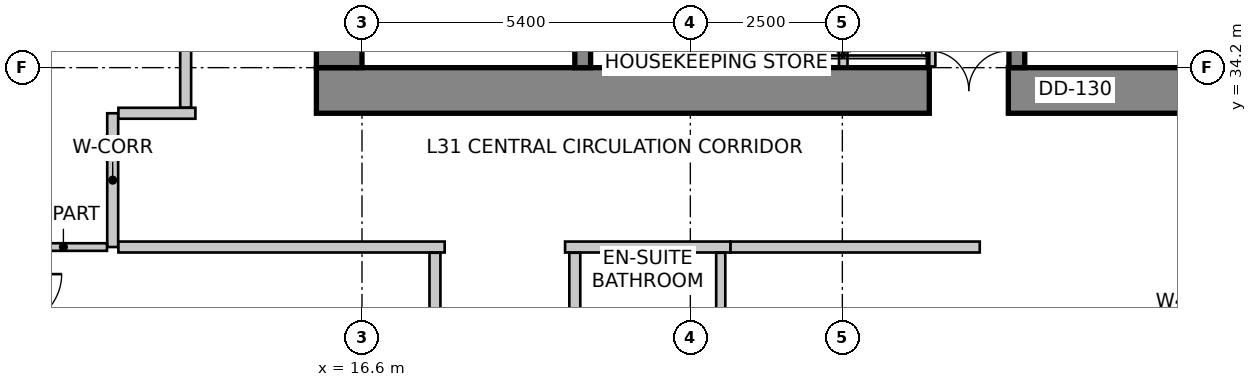
"""IFC4 building model, lengths in metres.
Left out: names, types, materials, properties, quantities, classifications, styles, units other than length and angle.
Written with IfcOpenShell. Run it as: python <this file> out.ifc"""

import sys

from ifc_helpers import new_model, si_unit, direction, frame, frame_2d, origin, place, context, subcontext, project, spatial, rectangle, extrude, source, transform, mapped, element, fill, save


model = new_model("IFC4")
c1 = context("Model", 3, precision=1e-05, world=origin(), true_north=direction((0.0, 1.0)))
c2 = subcontext(c1, "Body", "Model", "MODEL_VIEW")
j1 = project(units=[si_unit("LENGTHUNIT", "METRE"), si_unit("PLANEANGLEUNIT", "RADIAN")], contexts=[c1])
p1 = place(None, origin())
s1 = spatial("IfcSite", under=j1, at=p1, CompositionType="ELEMENT")
p2 = place(p1, origin())
s2 = spatial("IfcBuilding", under=s1, at=p2, CompositionType="ELEMENT")
p3 = place(p2, frame((0.0, 0.0, 128.6)))
s3 = spatial("IfcBuildingStorey", under=s2, at=p3, CompositionType="ELEMENT", Elevation=128.6)
p4 = place(p3, frame((15.85, 33.825, 0.0), z_axis=(0.0, 0.0, 1.0), x_axis=(1.0, 0.0, 0.0)))
e1 = element("IfcWall", 1, at=p4, inside=s3, PredefinedType="SHEAR", context=c2, shape_type="SweptSolid", body=[
    extrude(rectangle(XDim=15.9, YDim=0.75, at=frame_2d((7.95, 0.0))), origin(), (0.0, 0.0, 1.0), 3.6),
])
m1 = source(origin(), c2, "Body", "SweptSolid", [
    extrude(rectangle(XDim=1.3, YDim=2.15, at=frame_2d((0.65, 1.075))), frame((0.0, 0.385, 0.0), z_axis=(0.0, -1.0, 0.0), x_axis=(1.0, 0.0, 0.0)), (0.0, 0.0, 1.0), 0.77),
])
p5 = place(p4, frame((10.08, 0.0, 0.0)))
e2 = element("IfcOpeningElement", 2, at=p5, cuts=e1, PredefinedType="OPENING", context=c2, shape_type="MappedRepresentation", body=[
    mapped(m1, transform((0.0, 0.0, 0.0), scale=1.0)),
])
p6 = place(p3, frame((16.225, 34.2, 0.0), z_axis=(0.0, 0.0, 1.0), x_axis=(0.0, 1.0, 0.0)))
e3 = element("IfcWall", 3, at=p6, inside=s3, PredefinedType="SHEAR", context=c2, shape_type="SweptSolid", body=[
    extrude(rectangle(XDim=11.4, YDim=0.75, at=frame_2d((5.7, 0.0))), origin(), (0.0, 0.0, 1.0), 3.6),
])
m2 = source(origin(), c2, "Body", "SweptSolid", [
    extrude(rectangle(XDim=1.1, YDim=2.15, at=frame_2d((0.55, 1.075))), frame((0.0, 0.385, 0.0), z_axis=(0.0, -1.0, 0.0), x_axis=(1.0, 0.0, 0.0)), (0.0, 0.0, 1.0), 0.77),
])
p7 = place(p6, frame((7.15, 0.0, 0.0)))
e4 = element("IfcOpeningElement", 4, at=p7, cuts=e3, PredefinedType="OPENING", context=c2, shape_type="MappedRepresentation", body=[
    mapped(m2, transform((0.0, 0.0, 0.0), scale=1.0)),
])
p8 = place(p3, frame((20.23, 34.2, 0.0), z_axis=(0.0, 0.0, 1.0), x_axis=(0.0, 1.0, 0.0)))
e5 = element("IfcWall", 5, at=p8, inside=s3, PredefinedType="SHEAR", context=c2, shape_type="SweptSolid", body=[
    extrude(rectangle(XDim=9.06, YDim=0.26, at=frame_2d((4.53, 0.0))), origin(), (0.0, 0.0, 1.0), 3.6),
])
m3 = source(origin(), c2, "Body", "SweptSolid", [
    extrude(rectangle(XDim=1.1, YDim=2.15, at=frame_2d((0.55, 1.075))), frame((0.0, 0.14, 0.0), z_axis=(0.0, -1.0, 0.0), x_axis=(1.0, 0.0, 0.0)), (0.0, 0.0, 1.0), 0.28),
])
p9 = place(p8, frame((7.45, 0.0, 0.0)))
e6 = element("IfcOpeningElement", 6, at=p9, cuts=e5, PredefinedType="OPENING", context=c2, shape_type="MappedRepresentation", body=[
    mapped(m3, transform((0.0, 0.0, 0.0), scale=1.0)),
])
p10 = place(p3, frame((27.37, 34.2, 0.0), z_axis=(0.0, 0.0, 1.0), x_axis=(0.0, 1.0, 0.0)))
e7 = element("IfcWall", 7, at=p10, inside=s3, PredefinedType="SHEAR", context=c2, shape_type="SweptSolid", body=[
    extrude(rectangle(XDim=9.06, YDim=0.26, at=frame_2d((4.53, 0.0))), origin(), (0.0, 0.0, 1.0), 3.6),
])
p11 = place(p10, frame((7.45, 0.0, 0.0)))
e8 = element("IfcOpeningElement", 8, at=p11, cuts=e7, PredefinedType="OPENING", context=c2, shape_type="MappedRepresentation", body=[
    mapped(m3, transform((0.0, 0.0, 0.0), scale=1.0)),
])
p12 = place(p3, frame((28.884, 28.792, 0.0), z_axis=(0.0, 0.0, 1.0), x_axis=(0.707064797706, 0.707148762175, 0.0)))
e9 = element("IfcWall", 9, at=p12, inside=s3, PredefinedType="SOLIDWALL", context=c2, shape_type="SweptSolid", body=[
    extrude(rectangle(XDim=2.908, YDim=0.3, at=frame_2d((1.454, 0.0))), origin(), (0.0, 0.0, 1.0), 3.35),
])
m4 = source(origin(), c2, "Body", "SweptSolid", [
    extrude(rectangle(XDim=2.1, YDim=2.0, at=frame_2d((1.05, 1.0))), frame((0.0, 0.16, 0.0), z_axis=(0.0, -1.0, 0.0), x_axis=(1.0, 0.0, 0.0)), (0.0, 0.0, 1.0), 0.32),
])
p13 = place(p12, frame((0.404, 0.0, 0.85)))
e10 = element("IfcOpeningElement", 10, at=p13, cuts=e9, PredefinedType="OPENING", context=c2, shape_type="MappedRepresentation", body=[
    mapped(m4, transform((0.0, 0.0, 0.0), scale=1.0)),
])
p14 = place(p3, frame((13.269, 47.134, 0.0), z_axis=(0.0, 0.0, 1.0), x_axis=(-0.319929596295, -0.947441319246, 0.0)))
e11 = element("IfcWall", 11, at=p14, inside=s3, PredefinedType="SOLIDWALL", context=c2, shape_type="SweptSolid", body=[
    extrude(rectangle(XDim=16.134, YDim=0.3, at=frame_2d((8.067, 0.0))), origin(), (0.0, 0.0, 1.0), 3.35),
])
p15 = place(p14, frame((2.426, 0.0, 0.85)))
e12 = element("IfcOpeningElement", 12, at=p15, cuts=e11, PredefinedType="OPENING", context=c2, shape_type="MappedRepresentation", body=[
    mapped(m4, transform((0.0, 0.0, 0.0), scale=1.0)),
])
m5 = source(origin(), c2, "Body", "SweptSolid", [
    extrude(rectangle(XDim=2.4, YDim=2.2, at=frame_2d((1.2, 1.1))), frame((0.0, 0.16, 0.0), z_axis=(0.0, -1.0, 0.0), x_axis=(1.0, 0.0, 0.0)), (0.0, 0.0, 1.0), 0.32),
])
p16 = place(p14, frame((7.211, 0.0, 0.85)))
e13 = element("IfcOpeningElement", 13, at=p16, cuts=e11, PredefinedType="OPENING", context=c2, shape_type="MappedRepresentation", body=[
    mapped(m5, transform((0.0, 0.0, 0.0), scale=1.0)),
])
p17 = place(p14, frame((12.297, 0.0, 0.85)))
e14 = element("IfcOpeningElement", 14, at=p17, cuts=e11, PredefinedType="OPENING", context=c2, shape_type="MappedRepresentation", body=[
    mapped(m4, transform((0.0, 0.0, 0.0), scale=1.0)),
])
p18 = place(p3, frame((8.185, 31.834, 0.0), z_axis=(0.0, 0.0, 1.0), x_axis=(0.189707113148, -0.981840725994, 0.0)))
e15 = element("IfcWall", 15, at=p18, inside=s3, PredefinedType="SOLIDWALL", context=c2, shape_type="SweptSolid", body=[
    extrude(rectangle(XDim=21.221, YDim=0.3, at=frame_2d((10.611, 0.0))), origin(), (0.0, 0.0, 1.0), 3.35),
])
m6 = source(origin(), c2, "Body", "SweptSolid", [
    extrude(rectangle(XDim=1.5, YDim=1.8, at=frame_2d((0.75, 0.9))), frame((0.0, 0.16, 0.0), z_axis=(0.0, -1.0, 0.0), x_axis=(1.0, 0.0, 0.0)), (0.0, 0.0, 1.0), 0.32),
])
p19 = place(p18, frame((0.977, 0.0, 0.85)))
e16 = element("IfcOpeningElement", 16, at=p19, cuts=e15, PredefinedType="OPENING", context=c2, shape_type="MappedRepresentation", body=[
    mapped(m6, transform((0.0, 0.0, 0.0), scale=1.0)),
])
p20 = place(p18, frame((4.219, 0.0, 0.85)))
e17 = element("IfcOpeningElement", 17, at=p20, cuts=e15, PredefinedType="OPENING", context=c2, shape_type="MappedRepresentation", body=[
    mapped(m5, transform((0.0, 0.0, 0.0), scale=1.0)),
])
p21 = place(p18, frame((8.259, 0.0, 0.85)))
e18 = element("IfcOpeningElement", 18, at=p21, cuts=e15, PredefinedType="OPENING", context=c2, shape_type="MappedRepresentation", body=[
    mapped(m6, transform((0.0, 0.0, 0.0), scale=1.0)),
])
m7 = source(origin(), c2, "Body", "SweptSolid", [
    extrude(rectangle(XDim=1.8, YDim=2.1, at=frame_2d((0.9, 1.05))), frame((0.0, 0.16, 0.0), z_axis=(0.0, -1.0, 0.0), x_axis=(1.0, 0.0, 0.0)), (0.0, 0.0, 1.0), 0.32),
])
p22 = place(p18, frame((10.401, 0.0, 0.85)))
e19 = element("IfcOpeningElement", 19, at=p22, cuts=e15, PredefinedType="OPENING", context=c2, shape_type="MappedRepresentation", body=[
    mapped(m7, transform((0.0, 0.0, 0.0), scale=1.0)),
])
p23 = place(p18, frame((12.842, 0.0, 0.85)))
e20 = element("IfcOpeningElement", 20, at=p23, cuts=e15, PredefinedType="OPENING", context=c2, shape_type="MappedRepresentation", body=[
    mapped(m6, transform((0.0, 0.0, 0.0), scale=1.0)),
])
p24 = place(p18, frame((16.661, 0.0, 0.85)))
e21 = element("IfcOpeningElement", 21, at=p24, cuts=e15, PredefinedType="OPENING", context=c2, shape_type="MappedRepresentation", body=[
    mapped(m5, transform((0.0, 0.0, 0.0), scale=1.0)),
])
for number, where, z_axis, x_axis in (
    (22, (25.96, 34.22, 0.0), (0.0, 0.0, 1.0), (0.0, 1.0, 0.0)),
    (23, (23.07, 34.22, 0.0), (0.0, 0.0, 1.0), (0.0, 1.0, 0.0)),
    (24, (24.515, 34.22, 0.0), (0.0, 0.0, 1.0), (0.0, 1.0, 0.0)),
):
    element("IfcWall", number, at=place(p3, frame(where, z_axis=z_axis, x_axis=x_axis)), inside=s3, PredefinedType="SOLIDWALL", context=c2, shape_type="SweptSolid", body=[
        extrude(rectangle(XDim=1.62, YDim=0.14, at=frame_2d((0.81, 0.0))), origin(), (0.0, 0.0, 1.0), 2.642),
    ])
p25 = place(p3, frame((12.5, 31.25, 0.0), z_axis=(0.0, 0.0, 1.0), x_axis=(0.0, 1.0, 0.0)))
e25 = element("IfcWall", 25, at=p25, inside=s3, PredefinedType="PARTITIONING", context=c2, shape_type="SweptSolid", body=[
    extrude(rectangle(XDim=2.2, YDim=0.18, at=frame_2d((1.1, 0.0))), origin(), (0.0, 0.0, 1.0), 3.019),
])
p26 = place(p3, frame((12.594, 33.45, 0.0), z_axis=(0.0, 0.0, 1.0), x_axis=(1.0, 0.0, 0.0)))
e26 = element("IfcWall", 26, at=p26, inside=s3, PredefinedType="PARTITIONING", context=c2, shape_type="SweptSolid", body=[
    extrude(rectangle(XDim=1.266, YDim=0.18, at=frame_2d((0.633, 0.0))), origin(), (0.0, 0.0, 1.0), 3.35),
])
p27 = place(p3, frame((17.96, 31.25, 0.0), z_axis=(0.0, 0.0, 1.0), x_axis=(-1.0, 0.0, 0.0)))
e27 = element("IfcWall", 27, at=p27, inside=s3, PredefinedType="PARTITIONING", context=c2, shape_type="SweptSolid", body=[
    extrude(rectangle(XDim=5.366, YDim=0.18, at=frame_2d((2.683, 0.0))), origin(), (0.0, 0.0, 1.0), 3.019),
])
p28 = place(p3, frame((22.66, 31.25, 0.0), z_axis=(0.0, 0.0, 1.0), x_axis=(-1.0, 0.0, 0.0)))
e28 = element("IfcWall", 28, at=p28, inside=s3, PredefinedType="PARTITIONING", context=c2, shape_type="SweptSolid", body=[
    extrude(rectangle(XDim=2.72, YDim=0.18, at=frame_2d((1.36, 0.0))), origin(), (0.0, 0.0, 1.0), 3.019),
])
p29 = place(p3, frame((26.76, 31.25, 0.0), z_axis=(0.0, 0.0, 1.0), x_axis=(-1.0, 0.0, 0.0)))
e29 = element("IfcWall", 29, at=p29, inside=s3, PredefinedType="PARTITIONING", context=c2, shape_type="SweptSolid", body=[
    extrude(rectangle(XDim=4.098, YDim=0.18, at=frame_2d((2.049, 0.0))), origin(), (0.0, 0.0, 1.0), 3.35),
])
p30 = place(p3, frame((13.7, 33.544, 0.0), z_axis=(0.0, 0.0, 1.0), x_axis=(0.0, 1.0, 0.0)))
e30 = element("IfcWall", 30, at=p30, inside=s3, PredefinedType="PARTITIONING", context=c2, shape_type="SweptSolid", body=[
    extrude(rectangle(XDim=13.86, YDim=0.18, at=frame_2d((6.93, 0.0))), origin(), (0.0, 0.0, 1.0), 2.492),
])
m8 = source(origin(), c2, "Body", "SweptSolid", [
    extrude(rectangle(XDim=0.9, YDim=2.15, at=frame_2d((0.45, 1.075))), frame((0.0, 0.1, 0.0), z_axis=(0.0, -1.0, 0.0), x_axis=(1.0, 0.0, 0.0)), (0.0, 0.0, 1.0), 0.2),
])
p31 = place(p30, frame((4.253, 0.0, 0.0)))
e31 = element("IfcOpeningElement", 31, at=p31, cuts=e30, PredefinedType="OPENING", context=c2, shape_type="MappedRepresentation", body=[
    mapped(m8, transform((0.0, 0.0, 0.0), scale=1.0)),
])
p32 = place(p3, frame((12.406, 31.25, 0.0), z_axis=(0.0, 0.0, 1.0), x_axis=(-1.0, 0.0, 0.0)))
e32 = element("IfcWall", 32, at=p32, inside=s3, PredefinedType="PARTITIONING", context=c2, shape_type="SweptSolid", body=[
    extrude(rectangle(XDim=1.433, YDim=0.125, at=frame_2d((0.717, 0.0))), origin(), (0.0, 0.0, 1.0), 2.492),
])
p33 = place(p3, frame((17.8, 24.162, 0.0), z_axis=(0.0, 0.0, 1.0), x_axis=(0.0, 1.0, 0.0)))
e33 = element("IfcWall", 33, at=p33, inside=s3, PredefinedType="PARTITIONING", context=c2, shape_type="SweptSolid", body=[
    extrude(rectangle(XDim=6.994, YDim=0.18, at=frame_2d((3.497, 0.0))), origin(), (0.0, 0.0, 1.0), 2.803),
])
p34 = place(p33, frame((3.047, 0.0, 0.0)))
e34 = element("IfcOpeningElement", 34, at=p34, cuts=e33, PredefinedType="OPENING", context=c2, shape_type="MappedRepresentation", body=[
    mapped(m8, transform((0.0, 0.0, 0.0), scale=1.0)),
])
p35 = place(p3, frame((20.1, 31.156, 0.0), z_axis=(0.0, 0.0, 1.0), x_axis=(0.0, -1.0, 0.0)))
e35 = element("IfcWall", 35, at=p35, inside=s3, PredefinedType="PARTITIONING", context=c2, shape_type="SweptSolid", body=[
    extrude(rectangle(XDim=2.266, YDim=0.18, at=frame_2d((1.133, 0.0))), origin(), (0.0, 0.0, 1.0), 3.019),
])
p36 = place(p3, frame((22.5, 31.156, 0.0), z_axis=(0.0, 0.0, 1.0), x_axis=(0.0, -1.0, 0.0)))
e36 = element("IfcWall", 36, at=p36, inside=s3, PredefinedType="PARTITIONING", context=c2, shape_type="SweptSolid", body=[
    extrude(rectangle(XDim=2.027, YDim=0.15, at=frame_2d((1.014, 0.0))), origin(), (0.0, 0.0, 1.0), 3.019),
])
m9 = source(origin(), c2, "Body", "SweptSolid", [
    extrude(rectangle(XDim=2.1, YDim=2.0, at=frame_2d((1.05, 1.0))), frame((0.0, -0.015, 0.0), z_axis=(0.0, -1.0, 0.0), x_axis=(1.0, 0.0, 0.0)), (0.0, 0.0, 1.0), 0.06),
])
p37 = place(p13, origin())
e37 = element("IfcWindow", 37, at=p37, inside=s3, PartitioningType="SINGLE_PANEL", PredefinedType="WINDOW", context=c2, shape_type="MappedRepresentation", body=[
    mapped(m9, transform((0.0, 0.0, 0.0), scale=1.0)),
])
fill(e10, e37)
m10 = source(origin(), c2, "Body", "SweptSolid", [
    extrude(rectangle(XDim=1.3, YDim=2.15, at=frame_2d((0.65, 1.075))), frame((0.0, 0.025, 0.0), z_axis=(0.0, -1.0, 0.0), x_axis=(1.0, 0.0, 0.0)), (0.0, 0.0, 1.0), 0.05),
])
p38 = place(p5, origin())
e38 = element("IfcDoor", 38, at=p38, inside=s3, OperationType="DOUBLE_DOOR_SINGLE_SWING", PredefinedType="DOOR", context=c2, shape_type="MappedRepresentation", body=[
    mapped(m10, transform((0.0, 0.0, 0.0), scale=1.0)),
])
fill(e2, e38)
save(model, sys.argv[1])
